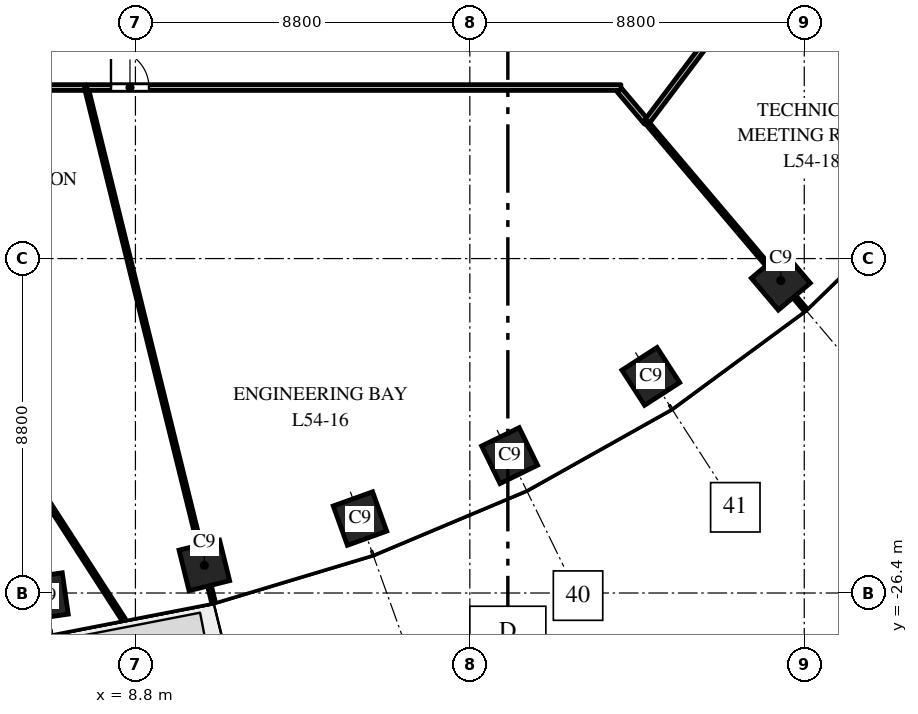
"""IFC4 building model, lengths in metres.
Left out: names, types, materials, properties, quantities, classifications, styles, units other than length and angle.
Written with IfcOpenShell. Run it as: python <this file> out.ifc"""

import sys

from ifc_helpers import new_model, si_unit, direction, frame, frame_2d, origin, origin_2d, place, context, subcontext, project, spatial, rectangle, extrude, element, fill, save


model = new_model("IFC4")
c1 = context("Model", 3, precision=1e-05, world=origin(), true_north=direction((0.0, 1.0)))
c2 = subcontext(c1, "Body", "Model", "MODEL_VIEW")
j1 = project(units=[si_unit("LENGTHUNIT", "METRE"), si_unit("PLANEANGLEUNIT", "RADIAN")], contexts=[c1])
p1 = place(None, origin())
s1 = spatial("IfcSite", under=j1, at=p1, CompositionType="ELEMENT")
p2 = place(p1, origin())
s2 = spatial("IfcBuilding", under=s1, at=p2, CompositionType="ELEMENT")
p3 = place(p2, frame((0.0, 0.0, 257.5)))
s3 = spatial("IfcBuildingStorey", under=s2, at=p3, CompositionType="ELEMENT", Elevation=257.5)
for number, where, z_axis, x_axis in (
    (1, (6.409, -26.491, 0.0), (0.0, 0.0, 1.0), (0.99, 0.143, 0.0)),
    (2, (10.613, -25.674, 0.0), (0.0, 0.0, 1.0), (0.971, 0.24, 0.0)),
    (3, (14.709, -24.441, 0.0), (0.0, 0.0, 1.0), (0.941, 0.338, 0.0)),
    (4, (18.646, -22.785, 0.0), (0.0, 0.0, 1.0), (0.898, 0.439, 0.0)),
    (5, (22.362, -20.7, 0.0), (0.0, 0.0, 1.0), (0.84, 0.542, 0.0)),
    (6, (25.783, -18.18, 0.0), (0.0, 0.0, 1.0), (0.763, 0.646, 0.0)),
):
    element("IfcColumn", number, at=place(p3, frame(where, z_axis=z_axis, x_axis=x_axis)), inside=s3, PredefinedType="COLUMN", context=c2, shape_type="SweptSolid", body=[
        extrude(rectangle(XDim=1.1, YDim=1.1, at=origin_2d()), origin(), (0.0, 0.0, 1.0), 4.0),
    ])
p4 = place(p3, frame((0.635, -14.932, 0.0), z_axis=(0.0, 0.0, 1.0), x_axis=(0.54231954128, -0.840172312771, 0.0)))
e7 = element("IfcWall", 7, at=p4, inside=s3, PredefinedType="PARTITIONING", context=c2, shape_type="SweptSolid", body=[
    extrude(rectangle(XDim=14.488, YDim=0.1, at=frame_2d((7.244, 0.0))), origin(), (0.0, 0.0, 1.0), 2.85),
])
p5 = place(p3, frame((1.036, -13.1, 0.0), z_axis=(0.0, 0.0, 1.0), x_axis=(1.0, 0.0, 0.0)))
e8 = element("IfcWall", 8, at=p5, inside=s3, PredefinedType="PARTITIONING", context=c2, shape_type="SweptSolid", body=[
    extrude(rectangle(XDim=6.471, YDim=0.15, at=frame_2d((3.236, 0.0))), origin(), (0.0, 0.0, 1.0), 2.85),
])
p6 = place(p5, frame((0.65, 0.0, 0.0)))
e9 = element("IfcOpeningElement", 9, at=p6, cuts=e8, PredefinedType="OPENING", context=c2, shape_type="SweptSolid", body=[
    extrude(rectangle(XDim=1.0, YDim=2.1, at=frame_2d((0.5, 1.05))), frame((0.0, 0.085, 0.0), z_axis=(0.0, -1.0, 0.0), x_axis=(1.0, 0.0, 0.0)), (0.0, 0.0, 1.0), 0.17),
])
p7 = place(p3, frame((7.507, -13.1, 0.0), z_axis=(0.0, 0.0, 1.0), x_axis=(0.239932883661, -0.970789478382, 0.0)))
e10 = element("IfcWall", 10, at=p7, inside=s3, PredefinedType="PARTITIONING", context=c2, shape_type="SweptSolid", body=[
    extrude(rectangle(XDim=13.953, YDim=0.1, at=frame_2d((6.977, 0.0))), origin(), (0.0, 0.0, 1.0), 3.0),
])
p8 = place(p3, frame((7.524, -13.1, 0.0), z_axis=(0.0, 0.0, 1.0), x_axis=(1.0, 0.0, 0.0)))
e11 = element("IfcWall", 11, at=p8, inside=s3, PredefinedType="PARTITIONING", context=c2, shape_type="SweptSolid", body=[
    extrude(rectangle(XDim=14.052, YDim=0.15, at=frame_2d((7.026, 0.0))), origin(), (0.0, 0.0, 1.0), 2.85),
])
p9 = place(p8, frame((0.633, 0.0, 0.0)))
e12 = element("IfcOpeningElement", 12, at=p9, cuts=e11, PredefinedType="OPENING", context=c2, shape_type="SweptSolid", body=[
    extrude(rectangle(XDim=1.0, YDim=2.1, at=frame_2d((0.5, 1.05))), frame((0.0, 0.085, 0.0), z_axis=(0.0, -1.0, 0.0), x_axis=(1.0, 0.0, 0.0)), (0.0, 0.0, 1.0), 0.17),
])
p10 = place(p3, frame((21.541, -13.175, 0.0), z_axis=(0.0, 0.0, 1.0), x_axis=(0.646460291141, -0.762947633837, 0.0)))
e13 = element("IfcWall", 13, at=p10, inside=s3, PredefinedType="PARTITIONING", context=c2, shape_type="SweptSolid", body=[
    extrude(rectangle(XDim=1.098, YDim=0.15, at=frame_2d((0.549, 0.0))), origin(), (0.0, 0.0, 1.0), 3.7),
])
p11 = place(p3, frame((22.251, -14.013, 0.0), z_axis=(0.0, 0.0, 1.0), x_axis=(0.602435944628, 0.798167233492, 0.0)))
e14 = element("IfcWall", 14, at=p11, inside=s3, PredefinedType="PARTITIONING", context=c2, shape_type="SweptSolid", body=[
    extrude(rectangle(XDim=4.245, YDim=0.15, at=frame_2d((2.122, 0.0))), origin(), (0.0, 0.0, 1.0), 2.75),
])
p12 = place(p3, frame((22.251, -14.013, 0.0), z_axis=(0.0, 0.0, 1.0), x_axis=(0.646448300096, -0.76295779392, 0.0)))
e15 = element("IfcWall", 15, at=p12, inside=s3, PredefinedType="PARTITIONING", context=c2, shape_type="SweptSolid", body=[
    extrude(rectangle(XDim=6.465, YDim=0.1, at=frame_2d((3.232, 0.0))), origin(), (0.0, 0.0, 1.0), 3.0),
])
p13 = place(p9, origin())
e16 = element("IfcDoor", 16, at=p13, inside=s3, OperationType="SINGLE_SWING_LEFT", PredefinedType="DOOR", context=c2, shape_type="SweptSolid", body=[
    extrude(rectangle(XDim=1.0, YDim=2.1, at=frame_2d((0.5, 1.05))), frame((0.0, 0.025, 0.0), z_axis=(0.0, -1.0, 0.0), x_axis=(1.0, 0.0, 0.0)), (0.0, 0.0, 1.0), 0.05),
])
fill(e12, e16)
save(model, sys.argv[1])
